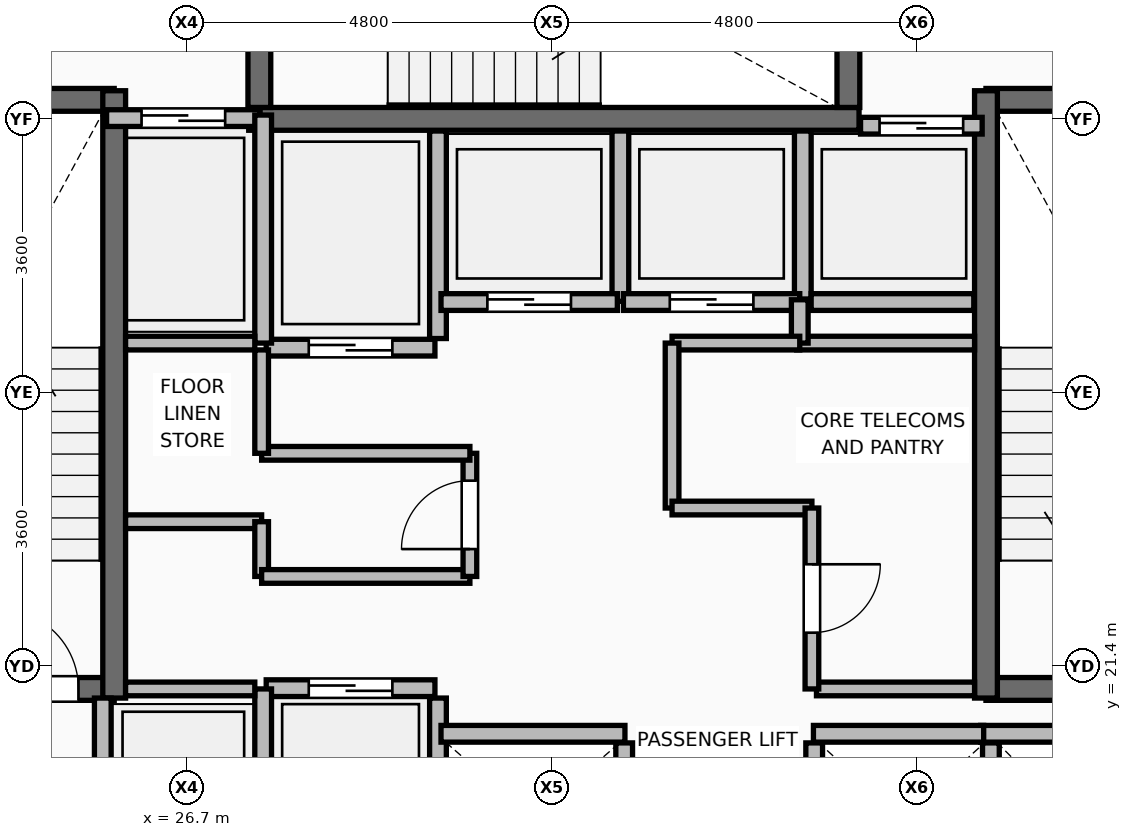
"""IFC4 building model, lengths in metres.
Left out: names, types, materials, properties, quantities, classifications, styles, units other than length and angle.
Written with IfcOpenShell. Run it as: python <this file> out.ifc"""

import sys

from ifc_helpers import new_model, si_unit, direction, frame, frame_2d, origin, place, context, subcontext, project, spatial, rectangle, extrude, element, fill, save


model = new_model("IFC4")
c1 = context("Model", 3, precision=1e-05, world=origin(), true_north=direction((0.0, 1.0)))
c2 = subcontext(c1, "Body", "Model", "MODEL_VIEW")
j1 = project(units=[si_unit("LENGTHUNIT", "METRE"), si_unit("PLANEANGLEUNIT", "RADIAN")], contexts=[c1])
p1 = place(None, origin())
s1 = spatial("IfcSite", under=j1, at=p1, CompositionType="ELEMENT")
p2 = place(p1, origin())
s2 = spatial("IfcBuilding", under=s1, at=p2, CompositionType="ELEMENT")
p3 = place(p2, frame((0.0, 0.0, 216.15)))
s3 = spatial("IfcBuildingStorey", under=s2, at=p3, CompositionType="ELEMENT", Elevation=216.15)
p4 = place(p3, frame((30.0, 18.08, 0.0), z_axis=(0.0, 0.0, 1.0), x_axis=(0.0, 1.0, 0.0)))
e1 = element("IfcWall", 1, at=p4, inside=s3, PredefinedType="PARTITIONING", context=c2, shape_type="SweptSolid", body=[
    extrude(rectangle(XDim=2.9, YDim=0.22, at=frame_2d((1.45, 0.0))), origin(), (0.0, 0.0, 1.0), 3.545),
])
for number, where, z_axis, x_axis in (
    (2, (32.45, 17.92, 0.0), (0.0, 0.0, 1.0), (0.0, 1.0, 0.0)),
    (3, (34.95, 17.92, 0.0), (0.0, 0.0, 1.0), (0.0, 1.0, 0.0)),
):
    element("IfcWall", number, at=place(p3, frame(where, z_axis=z_axis, x_axis=x_axis)), inside=s3, PredefinedType="PARTITIONING", context=c2, shape_type="SweptSolid", body=[
        extrude(rectangle(XDim=2.47, YDim=0.22, at=frame_2d((1.235, 0.0))), origin(), (0.0, 0.0, 1.0), 3.545),
    ])
p5 = place(p3, frame((37.275, 18.08, 0.0), z_axis=(0.0, 0.0, 1.0), x_axis=(0.0, 1.0, 0.0)))
e4 = element("IfcWall", 4, at=p5, inside=s3, PredefinedType="PARTITIONING", context=c2, shape_type="SweptSolid", body=[
    extrude(rectangle(XDim=2.31, YDim=0.22, at=frame_2d((1.155, 0.0))), origin(), (0.0, 0.0, 1.0), 3.545),
])
p6 = place(p3, frame((30.0, 25.71, 0.0), z_axis=(0.0, 0.0, 1.0), x_axis=(0.0, 1.0, 0.0)))
e5 = element("IfcWall", 5, at=p6, inside=s3, PredefinedType="PARTITIONING", context=c2, shape_type="SweptSolid", body=[
    extrude(rectangle(XDim=2.73, YDim=0.22, at=frame_2d((1.365, 0.0))), origin(), (0.0, 0.0, 1.0), 3.545),
])
p7 = place(p3, frame((32.4, 26.2, 0.0), z_axis=(0.0, 0.0, 1.0), x_axis=(0.0, 1.0, 0.0)))
e6 = element("IfcWall", 6, at=p7, inside=s3, PredefinedType="PARTITIONING", context=c2, shape_type="SweptSolid", body=[
    extrude(rectangle(XDim=2.24, YDim=0.22, at=frame_2d((1.12, 0.0))), origin(), (0.0, 0.0, 1.0), 3.545),
])
p8 = place(p3, frame((34.8, 26.23, 0.0), z_axis=(0.0, 0.0, 1.0), x_axis=(0.0, 1.0, 0.0)))
e7 = element("IfcWall", 7, at=p8, inside=s3, PredefinedType="PARTITIONING", context=c2, shape_type="SweptSolid", body=[
    extrude(rectangle(XDim=2.21, YDim=0.22, at=frame_2d((1.105, 0.0))), origin(), (0.0, 0.0, 1.0), 3.545),
])
p9 = place(p3, frame((34.91, 26.19, 0.0), z_axis=(0.0, 0.0, 1.0), x_axis=(1.0, 0.0, 0.0)))
e8 = element("IfcWall", 8, at=p9, inside=s3, PredefinedType="PARTITIONING", context=c2, shape_type="SweptSolid", body=[
    extrude(rectangle(XDim=2.14, YDim=0.22, at=frame_2d((1.07, 0.0))), origin(), (0.0, 0.0, 1.0), 3.545),
])
p10 = place(p3, frame((22.125, 21.1, 0.0), z_axis=(0.0, 0.0, 1.0), x_axis=(1.0, 0.0, 0.0)))
e9 = element("IfcWall", 9, at=p10, inside=s3, PredefinedType="SHEAR", context=c2, shape_type="SweptSolid", body=[
    extrude(rectangle(XDim=3.615, YDim=0.3, at=frame_2d((1.808, 0.0))), origin(), (0.0, 0.0, 1.0), 3.57),
])
p11 = place(p10, frame((2.095, 0.0, 0.0)))
e10 = element("IfcOpeningElement", 10, at=p11, cuts=e9, PredefinedType="OPENING", context=c2, shape_type="SweptSolid", body=[
    extrude(rectangle(XDim=1.05, YDim=2.1, at=frame_2d((0.525, 1.05))), frame((0.0, 0.16, 0.0), z_axis=(0.0, -1.0, 0.0), x_axis=(1.0, 0.0, 0.0)), (0.0, 0.0, 1.0), 0.32),
])
p12 = place(p3, frame((22.125, 28.85, 0.0), z_axis=(0.0, 0.0, 1.0), x_axis=(1.0, 0.0, 0.0)))
e11 = element("IfcWall", 11, at=p12, inside=s3, PredefinedType="SHEAR", context=c2, shape_type="SweptSolid", body=[
    extrude(rectangle(XDim=3.615, YDim=0.3, at=frame_2d((1.808, 0.0))), origin(), (0.0, 0.0, 1.0), 3.57),
])
p13 = place(p3, frame((25.74, 20.98, 0.0), z_axis=(0.0, 0.0, 1.0), x_axis=(0.0, 1.0, 0.0)))
e12 = element("IfcWall", 12, at=p13, inside=s3, PredefinedType="SHEAR", context=c2, shape_type="SweptSolid", body=[
    extrude(rectangle(XDim=7.99, YDim=0.3, at=frame_2d((3.995, 0.0))), origin(), (0.0, 0.0, 1.0), 3.57),
])
for number, where, z_axis, x_axis in (
    (13, (37.21, 21.1, 0.0), (0.0, 0.0, 1.0), (1.0, 0.0, 0.0)),
    (14, (37.21, 28.85, 0.0), (0.0, 0.0, 1.0), (1.0, 0.0, 0.0)),
):
    element("IfcWall", number, at=place(p3, frame(where, z_axis=z_axis, x_axis=x_axis)), inside=s3, PredefinedType="SHEAR", context=c2, shape_type="SweptSolid", body=[
        extrude(rectangle(XDim=3.665, YDim=0.3, at=frame_2d((1.833, 0.0))), origin(), (0.0, 0.0, 1.0), 3.57),
    ])
p14 = place(p3, frame((37.21, 20.98, 0.0), z_axis=(0.0, 0.0, 1.0), x_axis=(0.0, 1.0, 0.0)))
e15 = element("IfcWall", 15, at=p14, inside=s3, PredefinedType="SHEAR", context=c2, shape_type="SweptSolid", body=[
    extrude(rectangle(XDim=7.99, YDim=0.3, at=frame_2d((3.995, 0.0))), origin(), (0.0, 0.0, 1.0), 3.57),
])
p15 = place(p3, frame((27.51, 28.6, 0.0), z_axis=(0.0, 0.0, 1.0), x_axis=(1.0, 0.0, 0.0)))
e16 = element("IfcWall", 16, at=p15, inside=s3, PredefinedType="SHEAR", context=c2, shape_type="SweptSolid", body=[
    extrude(rectangle(XDim=8.03, YDim=0.3, at=frame_2d((4.015, 0.0))), origin(), (0.0, 0.0, 1.0), 3.57),
])
p16 = place(p3, frame((27.65, 28.75, 0.0), z_axis=(0.0, 0.0, 1.0), x_axis=(0.0, 1.0, 0.0)))
e17 = element("IfcWall", 17, at=p16, inside=s3, PredefinedType="SHEAR", context=c2, shape_type="SweptSolid", body=[
    extrude(rectangle(XDim=3.475, YDim=0.3, at=frame_2d((1.738, 0.0))), origin(), (0.0, 0.0, 1.0), 3.57),
])
p17 = place(p16, frame((1.0, 0.0, 0.0)))
e18 = element("IfcOpeningElement", 18, at=p17, cuts=e17, PredefinedType="OPENING", context=c2, shape_type="SweptSolid", body=[
    extrude(rectangle(XDim=1.05, YDim=2.1, at=frame_2d((0.525, 1.05))), frame((0.0, 0.16, 0.0), z_axis=(0.0, -1.0, 0.0), x_axis=(1.0, 0.0, 0.0)), (0.0, 0.0, 1.0), 0.32),
])
p18 = place(p3, frame((35.4, 28.75, 0.0), z_axis=(0.0, 0.0, 1.0), x_axis=(0.0, 1.0, 0.0)))
e19 = element("IfcWall", 19, at=p18, inside=s3, PredefinedType="SHEAR", context=c2, shape_type="SweptSolid", body=[
    extrude(rectangle(XDim=3.475, YDim=0.3, at=frame_2d((1.738, 0.0))), origin(), (0.0, 0.0, 1.0), 3.57),
])
p19 = place(p3, frame((25.59, 18.22, 0.0), z_axis=(0.0, 0.0, 1.0), x_axis=(0.0, 1.0, 0.0)))
e20 = element("IfcWall", 20, at=p19, inside=s3, PredefinedType="PARTITIONING", context=c2, shape_type="SweptSolid", body=[
    extrude(rectangle(XDim=2.76, YDim=0.22, at=frame_2d((1.38, 0.0))), origin(), (0.0, 0.0, 1.0), 3.55),
])
p20 = place(p19, frame((0.83, 0.0, 0.0)))
e21 = element("IfcOpeningElement", 21, at=p20, cuts=e20, PredefinedType="OPENING", context=c2, shape_type="SweptSolid", body=[
    extrude(rectangle(XDim=1.1, YDim=2.2, at=frame_2d((0.55, 1.1))), frame((0.0, 0.12, 0.0), z_axis=(0.0, -1.0, 0.0), x_axis=(1.0, 0.0, 0.0)), (0.0, 0.0, 1.0), 0.24),
])
p21 = place(p3, frame((25.64, 28.61, 0.0), z_axis=(0.0, 0.0, 1.0), x_axis=(1.0, 0.0, 0.0)))
e22 = element("IfcWall", 22, at=p21, inside=s3, PredefinedType="PARTITIONING", context=c2, shape_type="SweptSolid", body=[
    extrude(rectangle(XDim=2.02, YDim=0.22, at=frame_2d((1.01, 0.0))), origin(), (0.0, 0.0, 1.0), 3.55),
])
p22 = place(p21, frame((0.46, 0.0, 0.0)))
e23 = element("IfcOpeningElement", 23, at=p22, cuts=e22, PredefinedType="OPENING", context=c2, shape_type="SweptSolid", body=[
    extrude(rectangle(XDim=1.1, YDim=2.2, at=frame_2d((0.55, 1.1))), frame((0.0, 0.12, 0.0), z_axis=(0.0, -1.0, 0.0), x_axis=(1.0, 0.0, 0.0)), (0.0, 0.0, 1.0), 0.24),
])
p23 = place(p3, frame((27.74, 21.11, 0.0), z_axis=(0.0, 0.0, 1.0), x_axis=(1.0, 0.0, 0.0)))
e24 = element("IfcWall", 24, at=p23, inside=s3, PredefinedType="PARTITIONING", context=c2, shape_type="SweptSolid", body=[
    extrude(rectangle(XDim=2.22, YDim=0.22, at=frame_2d((1.11, 0.0))), origin(), (0.0, 0.0, 1.0), 3.55),
])
p24 = place(p23, frame((0.56, 0.0, 0.0)))
e25 = element("IfcOpeningElement", 25, at=p24, cuts=e24, PredefinedType="OPENING", context=c2, shape_type="SweptSolid", body=[
    extrude(rectangle(XDim=1.1, YDim=2.2, at=frame_2d((0.55, 1.1))), frame((0.0, 0.12, 0.0), z_axis=(0.0, -1.0, 0.0), x_axis=(1.0, 0.0, 0.0)), (0.0, 0.0, 1.0), 0.24),
])
p25 = place(p3, frame((27.74, 25.59, 0.0), z_axis=(0.0, 0.0, 1.0), x_axis=(1.0, 0.0, 0.0)))
e26 = element("IfcWall", 26, at=p25, inside=s3, PredefinedType="PARTITIONING", context=c2, shape_type="SweptSolid", body=[
    extrude(rectangle(XDim=2.22, YDim=0.22, at=frame_2d((1.11, 0.0))), origin(), (0.0, 0.0, 1.0), 3.55),
])
p26 = place(p25, frame((0.56, 0.0, 0.0)))
e27 = element("IfcOpeningElement", 27, at=p26, cuts=e26, PredefinedType="OPENING", context=c2, shape_type="SweptSolid", body=[
    extrude(rectangle(XDim=1.1, YDim=2.2, at=frame_2d((0.55, 1.1))), frame((0.0, 0.12, 0.0), z_axis=(0.0, -1.0, 0.0), x_axis=(1.0, 0.0, 0.0)), (0.0, 0.0, 1.0), 0.24),
])
p27 = place(p3, frame((30.04, 20.51, 0.0), z_axis=(0.0, 0.0, 1.0), x_axis=(1.0, 0.0, 0.0)))
e28 = element("IfcWall", 28, at=p27, inside=s3, PredefinedType="PARTITIONING", context=c2, shape_type="SweptSolid", body=[
    extrude(rectangle(XDim=2.42, YDim=0.22, at=frame_2d((1.21, 0.0))), origin(), (0.0, 0.0, 1.0), 3.55),
])
for number, where, z_axis, x_axis in (
    (29, (37.14, 20.51, 0.0), (0.0, 0.0, 1.0), (1.0, 0.0, 0.0)),
    (30, (34.94, 20.51, 0.0), (0.0, 0.0, 1.0), (1.0, 0.0, 0.0)),
):
    element("IfcWall", number, at=place(p3, frame(where, z_axis=z_axis, x_axis=x_axis)), inside=s3, PredefinedType="PARTITIONING", context=c2, shape_type="SweptSolid", body=[
        extrude(rectangle(XDim=2.24, YDim=0.22, at=frame_2d((1.12, 0.0))), origin(), (0.0, 0.0, 1.0), 3.55),
    ])
p28 = place(p3, frame((30.04, 26.19, 0.0), z_axis=(0.0, 0.0, 1.0), x_axis=(1.0, 0.0, 0.0)))
e31 = element("IfcWall", 31, at=p28, inside=s3, PredefinedType="PARTITIONING", context=c2, shape_type="SweptSolid", body=[
    extrude(rectangle(XDim=2.32, YDim=0.22, at=frame_2d((1.16, 0.0))), origin(), (0.0, 0.0, 1.0), 3.55),
])
p29 = place(p28, frame((0.61, 0.0, 0.0)))
e32 = element("IfcOpeningElement", 32, at=p29, cuts=e31, PredefinedType="OPENING", context=c2, shape_type="SweptSolid", body=[
    extrude(rectangle(XDim=1.1, YDim=2.2, at=frame_2d((0.55, 1.1))), frame((0.0, 0.12, 0.0), z_axis=(0.0, -1.0, 0.0), x_axis=(1.0, 0.0, 0.0)), (0.0, 0.0, 1.0), 0.24),
])
p30 = place(p3, frame((32.44, 26.19, 0.0), z_axis=(0.0, 0.0, 1.0), x_axis=(1.0, 0.0, 0.0)))
e33 = element("IfcWall", 33, at=p30, inside=s3, PredefinedType="PARTITIONING", context=c2, shape_type="SweptSolid", body=[
    extrude(rectangle(XDim=2.32, YDim=0.22, at=frame_2d((1.16, 0.0))), origin(), (0.0, 0.0, 1.0), 3.55),
])
p31 = place(p30, frame((0.61, 0.0, 0.0)))
e34 = element("IfcOpeningElement", 34, at=p31, cuts=e33, PredefinedType="OPENING", context=c2, shape_type="SweptSolid", body=[
    extrude(rectangle(XDim=1.1, YDim=2.2, at=frame_2d((0.55, 1.1))), frame((0.0, 0.12, 0.0), z_axis=(0.0, -1.0, 0.0), x_axis=(1.0, 0.0, 0.0)), (0.0, 0.0, 1.0), 0.24),
])
p32 = place(p3, frame((35.56, 28.51, 0.0), z_axis=(0.0, 0.0, 1.0), x_axis=(1.0, 0.0, 0.0)))
e35 = element("IfcWall", 35, at=p32, inside=s3, PredefinedType="PARTITIONING", context=c2, shape_type="SweptSolid", body=[
    extrude(rectangle(XDim=1.6, YDim=0.22, at=frame_2d((0.8, 0.0))), origin(), (0.0, 0.0, 1.0), 3.55),
])
p33 = place(p32, frame((0.25, 0.0, 0.0)))
e36 = element("IfcOpeningElement", 36, at=p33, cuts=e35, PredefinedType="OPENING", context=c2, shape_type="SweptSolid", body=[
    extrude(rectangle(XDim=1.1, YDim=2.2, at=frame_2d((0.55, 1.1))), frame((0.0, 0.12, 0.0), z_axis=(0.0, -1.0, 0.0), x_axis=(1.0, 0.0, 0.0)), (0.0, 0.0, 1.0), 0.24),
])
p34 = place(p3, frame((27.7, 18.15, 0.0), z_axis=(0.0, 0.0, 1.0), x_axis=(0.0, 1.0, 0.0)))
e37 = element("IfcWall", 37, at=p34, inside=s3, PredefinedType="PARTITIONING", context=c2, shape_type="SweptSolid", body=[
    extrude(rectangle(XDim=2.95, YDim=0.22, at=frame_2d((1.475, 0.0))), origin(), (0.0, 0.0, 1.0), 3.55),
])
p35 = place(p3, frame((27.7, 25.65, 0.0), z_axis=(0.0, 0.0, 1.0), x_axis=(0.0, 1.0, 0.0)))
e38 = element("IfcWall", 38, at=p35, inside=s3, PredefinedType="PARTITIONING", context=c2, shape_type="SweptSolid", body=[
    extrude(rectangle(XDim=3.0, YDim=0.22, at=frame_2d((1.5, 0.0))), origin(), (0.0, 0.0, 1.0), 3.55),
])
for number, where, z_axis, x_axis in (
    (39, (25.89, 21.1, 0.0), (0.0, 0.0, 1.0), (1.0, 0.0, 0.0)),
    (40, (25.89, 25.65, 0.0), (0.0, 0.0, 1.0), (1.0, 0.0, 0.0)),
):
    element("IfcWall", number, at=place(p3, frame(where, z_axis=z_axis, x_axis=x_axis)), inside=s3, PredefinedType="PARTITIONING", context=c2, shape_type="SweptSolid", body=[
        extrude(rectangle(XDim=1.7, YDim=0.18, at=frame_2d((0.85, 0.0))), origin(), (0.0, 0.0, 1.0), 3.55),
    ])
p36 = place(p3, frame((25.89, 23.3, 0.0), z_axis=(0.0, 0.0, 1.0), x_axis=(1.0, 0.0, 0.0)))
e41 = element("IfcWall", 41, at=p36, inside=s3, PredefinedType="PARTITIONING", context=c2, shape_type="SweptSolid", body=[
    extrude(rectangle(XDim=1.79, YDim=0.18, at=frame_2d((0.895, 0.0))), origin(), (0.0, 0.0, 1.0), 3.55),
])
p37 = place(p3, frame((27.68, 22.58, 0.0), z_axis=(0.0, 0.0, 1.0), x_axis=(0.0, 1.0, 0.0)))
e42 = element("IfcWall", 42, at=p37, inside=s3, PredefinedType="PARTITIONING", context=c2, shape_type="SweptSolid", body=[
    extrude(rectangle(XDim=0.72, YDim=0.18, at=frame_2d((0.36, 0.0))), origin(), (0.0, 0.0, 1.0), 3.55),
])
p38 = place(p3, frame((27.68, 22.58, 0.0), z_axis=(0.0, 0.0, 1.0), x_axis=(1.0, 0.0, 0.0)))
e43 = element("IfcWall", 43, at=p38, inside=s3, PredefinedType="PARTITIONING", context=c2, shape_type="SweptSolid", body=[
    extrude(rectangle(XDim=2.74, YDim=0.18, at=frame_2d((1.37, 0.0))), origin(), (0.0, 0.0, 1.0), 3.55),
])
p39 = place(p3, frame((30.42, 22.58, 0.0), z_axis=(0.0, 0.0, 1.0), x_axis=(0.0, 1.0, 0.0)))
e44 = element("IfcWall", 44, at=p39, inside=s3, PredefinedType="PARTITIONING", context=c2, shape_type="SweptSolid", body=[
    extrude(rectangle(XDim=1.62, YDim=0.18, at=frame_2d((0.81, 0.0))), origin(), (0.0, 0.0, 1.0), 3.55),
])
p40 = place(p39, frame((0.36, 0.0, 0.0)))
e45 = element("IfcOpeningElement", 45, at=p40, cuts=e44, PredefinedType="OPENING", context=c2, shape_type="SweptSolid", body=[
    extrude(rectangle(XDim=0.9, YDim=2.1, at=frame_2d((0.45, 1.05))), frame((0.0, 0.1, 0.0), z_axis=(0.0, -1.0, 0.0), x_axis=(1.0, 0.0, 0.0)), (0.0, 0.0, 1.0), 0.2),
])
p41 = place(p3, frame((27.68, 24.2, 0.0), z_axis=(0.0, 0.0, 1.0), x_axis=(1.0, 0.0, 0.0)))
e46 = element("IfcWall", 46, at=p41, inside=s3, PredefinedType="PARTITIONING", context=c2, shape_type="SweptSolid", body=[
    extrude(rectangle(XDim=2.74, YDim=0.18, at=frame_2d((1.37, 0.0))), origin(), (0.0, 0.0, 1.0), 3.55),
])
p42 = place(p3, frame((27.68, 24.2, 0.0), z_axis=(0.0, 0.0, 1.0), x_axis=(0.0, 1.0, 0.0)))
e47 = element("IfcWall", 47, at=p42, inside=s3, PredefinedType="PARTITIONING", context=c2, shape_type="SweptSolid", body=[
    extrude(rectangle(XDim=1.36, YDim=0.18, at=frame_2d((0.68, 0.0))), origin(), (0.0, 0.0, 1.0), 3.55),
])
p43 = place(p3, frame((34.98, 21.1, 0.0), z_axis=(0.0, 0.0, 1.0), x_axis=(1.0, 0.0, 0.0)))
e48 = element("IfcWall", 48, at=p43, inside=s3, PredefinedType="PARTITIONING", context=c2, shape_type="SweptSolid", body=[
    extrude(rectangle(XDim=2.08, YDim=0.18, at=frame_2d((1.04, 0.0))), origin(), (0.0, 0.0, 1.0), 3.55),
])
p44 = place(p3, frame((34.72, 25.65, 0.0), z_axis=(0.0, 0.0, 1.0), x_axis=(1.0, 0.0, 0.0)))
e49 = element("IfcWall", 49, at=p44, inside=s3, PredefinedType="PARTITIONING", context=c2, shape_type="SweptSolid", body=[
    extrude(rectangle(XDim=2.34, YDim=0.18, at=frame_2d((1.17, 0.0))), origin(), (0.0, 0.0, 1.0), 3.55),
])
p45 = place(p3, frame((34.76, 25.65, 0.0), z_axis=(0.0, 0.0, 1.0), x_axis=(0.0, 1.0, 0.0)))
e50 = element("IfcWall", 50, at=p45, inside=s3, PredefinedType="PARTITIONING", context=c2, shape_type="SweptSolid", body=[
    extrude(rectangle(XDim=0.57, YDim=0.22, at=frame_2d((0.285, 0.0))), origin(), (0.0, 0.0, 1.0), 3.55),
])
p46 = place(p3, frame((33.08, 25.65, 0.0), z_axis=(0.0, 0.0, 1.0), x_axis=(1.0, 0.0, 0.0)))
e51 = element("IfcWall", 51, at=p46, inside=s3, PredefinedType="PARTITIONING", context=c2, shape_type="SweptSolid", body=[
    extrude(rectangle(XDim=1.68, YDim=0.18, at=frame_2d((0.84, 0.0))), origin(), (0.0, 0.0, 1.0), 3.55),
])
p47 = place(p3, frame((33.08, 23.48, 0.0), z_axis=(0.0, 0.0, 1.0), x_axis=(0.0, 1.0, 0.0)))
e52 = element("IfcWall", 52, at=p47, inside=s3, PredefinedType="PARTITIONING", context=c2, shape_type="SweptSolid", body=[
    extrude(rectangle(XDim=2.17, YDim=0.18, at=frame_2d((1.085, 0.0))), origin(), (0.0, 0.0, 1.0), 3.55),
])
p48 = place(p3, frame((33.08, 23.48, 0.0), z_axis=(0.0, 0.0, 1.0), x_axis=(1.0, 0.0, 0.0)))
e53 = element("IfcWall", 53, at=p48, inside=s3, PredefinedType="PARTITIONING", context=c2, shape_type="SweptSolid", body=[
    extrude(rectangle(XDim=1.84, YDim=0.18, at=frame_2d((0.92, 0.0))), origin(), (0.0, 0.0, 1.0), 3.55),
])
p49 = place(p3, frame((34.92, 21.1, 0.0), z_axis=(0.0, 0.0, 1.0), x_axis=(0.0, 1.0, 0.0)))
e54 = element("IfcWall", 54, at=p49, inside=s3, PredefinedType="PARTITIONING", context=c2, shape_type="SweptSolid", body=[
    extrude(rectangle(XDim=2.38, YDim=0.18, at=frame_2d((1.19, 0.0))), origin(), (0.0, 0.0, 1.0), 3.55),
])
p50 = place(p49, frame((0.74, 0.0, 0.0)))
e55 = element("IfcOpeningElement", 55, at=p50, cuts=e54, PredefinedType="OPENING", context=c2, shape_type="SweptSolid", body=[
    extrude(rectangle(XDim=0.9, YDim=2.1, at=frame_2d((0.45, 1.05))), frame((0.0, 0.1, 0.0), z_axis=(0.0, -1.0, 0.0), x_axis=(1.0, 0.0, 0.0)), (0.0, 0.0, 1.0), 0.2),
])
p51 = place(p11, origin())
e56 = element("IfcDoor", 56, at=p51, inside=s3, OperationType="SINGLE_SWING_LEFT", PredefinedType="DOOR", context=c2, shape_type="SweptSolid", body=[
    extrude(rectangle(XDim=1.05, YDim=2.1, at=frame_2d((0.525, 1.05))), frame((0.0, 0.025, 0.0), z_axis=(0.0, -1.0, 0.0), x_axis=(1.0, 0.0, 0.0)), (0.0, 0.0, 1.0), 0.05),
])
fill(e10, e56)
p52 = place(p22, origin())
e57 = element("IfcDoor", 57, at=p52, inside=s3, OperationType="DOUBLE_DOOR_SLIDING", PredefinedType="DOOR", context=c2, shape_type="SweptSolid", body=[
    extrude(rectangle(XDim=1.1, YDim=2.2, at=frame_2d((0.55, 1.1))), frame((0.0, 0.025, 0.0), z_axis=(0.0, -1.0, 0.0), x_axis=(1.0, 0.0, 0.0)), (0.0, 0.0, 1.0), 0.05),
])
fill(e23, e57)
p53 = place(p24, origin())
e58 = element("IfcDoor", 58, at=p53, inside=s3, OperationType="DOUBLE_DOOR_SLIDING", PredefinedType="DOOR", context=c2, shape_type="SweptSolid", body=[
    extrude(rectangle(XDim=1.1, YDim=2.2, at=frame_2d((0.55, 1.1))), frame((0.0, 0.025, 0.0), z_axis=(0.0, -1.0, 0.0), x_axis=(1.0, 0.0, 0.0)), (0.0, 0.0, 1.0), 0.05),
])
fill(e25, e58)
p54 = place(p26, frame((1.1, 0.0, 0.0), z_axis=(0.0, 0.0, 1.0), x_axis=(-1.0, 0.0, 0.0)))
e59 = element("IfcDoor", 59, at=p54, inside=s3, OperationType="DOUBLE_DOOR_SLIDING", PredefinedType="DOOR", context=c2, shape_type="SweptSolid", body=[
    extrude(rectangle(XDim=1.1, YDim=2.2, at=frame_2d((0.55, 1.1))), frame((0.0, 0.025, 0.0), z_axis=(0.0, -1.0, 0.0), x_axis=(1.0, 0.0, 0.0)), (0.0, 0.0, 1.0), 0.05),
])
fill(e27, e59)
p55 = place(p29, frame((1.1, 0.0, 0.0), z_axis=(0.0, 0.0, 1.0), x_axis=(-1.0, 0.0, 0.0)))
e60 = element("IfcDoor", 60, at=p55, inside=s3, OperationType="DOUBLE_DOOR_SLIDING", PredefinedType="DOOR", context=c2, shape_type="SweptSolid", body=[
    extrude(rectangle(XDim=1.1, YDim=2.2, at=frame_2d((0.55, 1.1))), frame((0.0, 0.025, 0.0), z_axis=(0.0, -1.0, 0.0), x_axis=(1.0, 0.0, 0.0)), (0.0, 0.0, 1.0), 0.05),
])
fill(e32, e60)
p56 = place(p31, frame((1.1, 0.0, 0.0), z_axis=(0.0, 0.0, 1.0), x_axis=(-1.0, 0.0, 0.0)))
e61 = element("IfcDoor", 61, at=p56, inside=s3, OperationType="DOUBLE_DOOR_SLIDING", PredefinedType="DOOR", context=c2, shape_type="SweptSolid", body=[
    extrude(rectangle(XDim=1.1, YDim=2.2, at=frame_2d((0.55, 1.1))), frame((0.0, 0.025, 0.0), z_axis=(0.0, -1.0, 0.0), x_axis=(1.0, 0.0, 0.0)), (0.0, 0.0, 1.0), 0.05),
])
fill(e34, e61)
p57 = place(p33, origin())
e62 = element("IfcDoor", 62, at=p57, inside=s3, OperationType="DOUBLE_DOOR_SLIDING", PredefinedType="DOOR", context=c2, shape_type="SweptSolid", body=[
    extrude(rectangle(XDim=1.1, YDim=2.2, at=frame_2d((0.55, 1.1))), frame((0.0, 0.025, 0.0), z_axis=(0.0, -1.0, 0.0), x_axis=(1.0, 0.0, 0.0)), (0.0, 0.0, 1.0), 0.05),
])
fill(e36, e62)
p58 = place(p40, origin())
e63 = element("IfcDoor", 63, at=p58, inside=s3, OperationType="SINGLE_SWING_LEFT", PredefinedType="DOOR", context=c2, shape_type="SweptSolid", body=[
    extrude(rectangle(XDim=0.9, YDim=2.1, at=frame_2d((0.45, 1.05))), frame((0.0, 0.025, 0.0), z_axis=(0.0, -1.0, 0.0), x_axis=(1.0, 0.0, 0.0)), (0.0, 0.0, 1.0), 0.05),
])
fill(e45, e63)
p59 = place(p50, frame((0.9, 0.0, 0.0), z_axis=(0.0, 0.0, 1.0), x_axis=(-1.0, 0.0, 0.0)))
e64 = element("IfcDoor", 64, at=p59, inside=s3, OperationType="SINGLE_SWING_LEFT", PredefinedType="DOOR", context=c2, shape_type="SweptSolid", body=[
    extrude(rectangle(XDim=0.9, YDim=2.1, at=frame_2d((0.45, 1.05))), frame((0.0, 0.025, 0.0), z_axis=(0.0, -1.0, 0.0), x_axis=(1.0, 0.0, 0.0)), (0.0, 0.0, 1.0), 0.05),
])
fill(e55, e64)
save(model, sys.argv[1])
